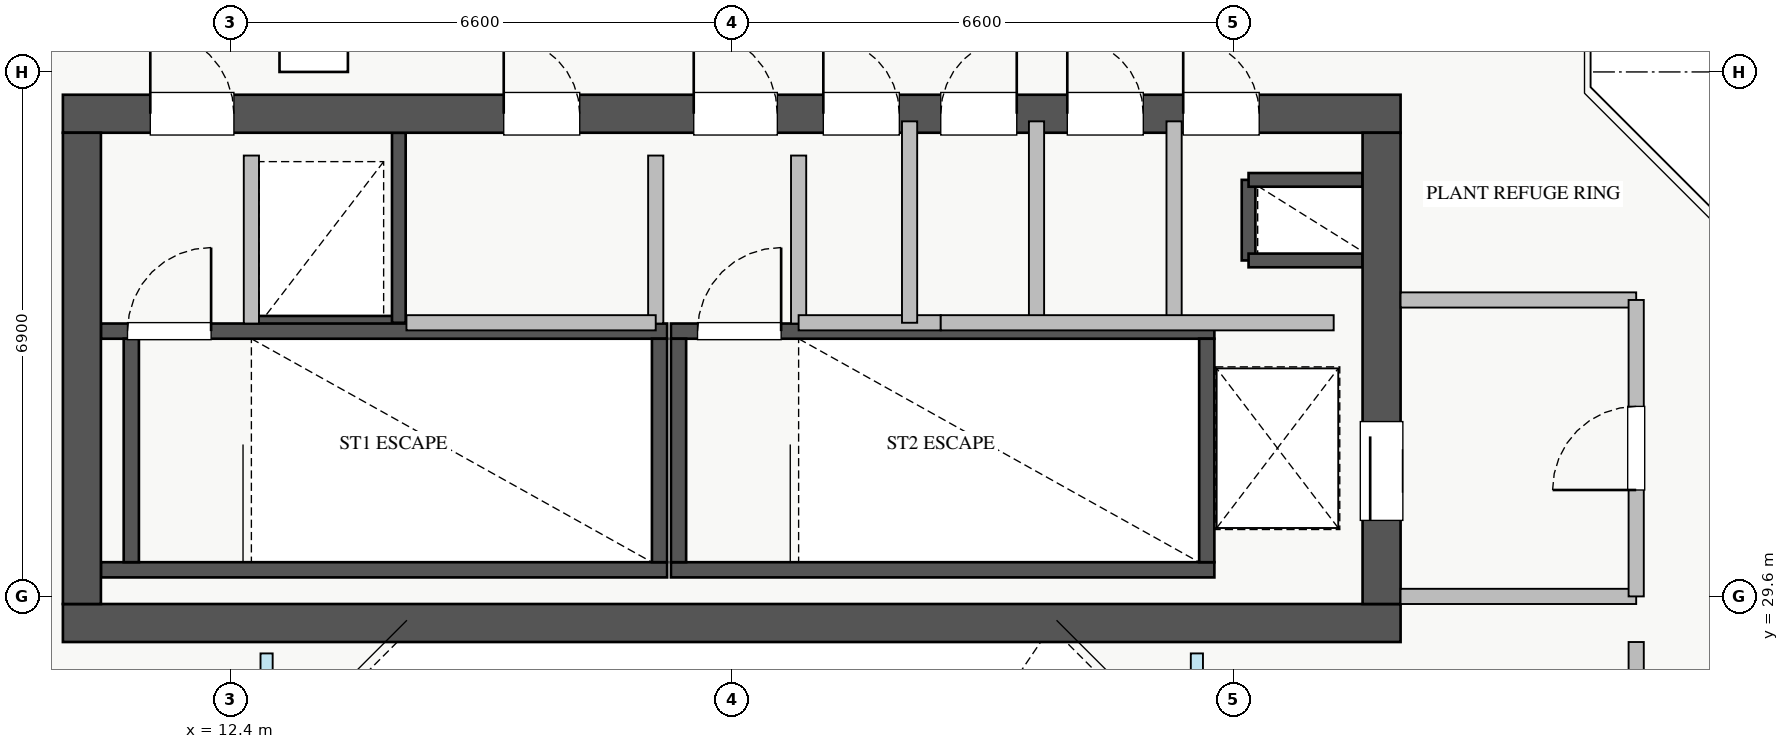
"""IFC4 building model, lengths in metres.
Left out: names, types, materials, properties, quantities, classifications, styles, units other than length and angle.
Written with IfcOpenShell. Run it as: python <this file> out.ifc"""

import sys

from ifc_helpers import new_model, si_unit, direction, frame, frame_2d, origin, origin_2d, place, context, subcontext, project, spatial, rectangle, extrude, source, transform, mapped, element, fill, save


model = new_model("IFC4")
c1 = context("Model", 3, precision=1e-05, world=origin(), true_north=direction((0.0, 1.0)))
c2 = subcontext(c1, "Body", "Model", "MODEL_VIEW")
j1 = project(units=[si_unit("LENGTHUNIT", "METRE"), si_unit("PLANEANGLEUNIT", "RADIAN")], contexts=[c1])
p1 = place(None, origin())
s1 = spatial("IfcSite", under=j1, at=p1, CompositionType="ELEMENT")
p2 = place(p1, origin())
s2 = spatial("IfcBuilding", under=s1, at=p2, CompositionType="ELEMENT")
p3 = place(p2, frame((0.0, 0.0, 263.25)))
s3 = spatial("IfcBuildingStorey", under=s2, at=p3, CompositionType="ELEMENT", Elevation=263.25)
p4 = place(p3, frame((12.68, 33.2, 0.0), z_axis=(0.0, 0.0, 1.0), x_axis=(1.0, 0.0, 0.0)))
e1 = element("IfcWall", 1, at=p4, inside=s3, PredefinedType="SHEAR", context=c2, shape_type="SweptSolid", body=[
    extrude(rectangle(XDim=1.94, YDim=0.18, at=frame_2d((0.97, 0.0))), origin(), (0.0, 0.0, 1.0), 4.25),
])
p5 = place(p3, frame((14.62, 33.2, 0.0), z_axis=(0.0, 0.0, 1.0), x_axis=(0.0, 1.0, 0.0)))
e2 = element("IfcWall", 2, at=p5, inside=s3, PredefinedType="SHEAR", context=c2, shape_type="SweptSolid", body=[
    extrude(rectangle(XDim=2.5, YDim=0.18, at=frame_2d((1.25, 0.0))), origin(), (0.0, 0.0, 1.0), 4.25),
])
p6 = place(p3, frame((25.8, 34.02, 0.0), z_axis=(0.0, 0.0, 1.0), x_axis=(0.0, 1.0, 0.0)))
e3 = element("IfcWall", 3, at=p6, inside=s3, PredefinedType="SHEAR", context=c2, shape_type="SweptSolid", body=[
    extrude(rectangle(XDim=1.06, YDim=0.18, at=frame_2d((0.53, 0.0))), origin(), (0.0, 0.0, 1.0), 4.25),
])
for number, where, z_axis, x_axis in (
    (4, (25.8, 35.08, 0.0), (0.0, 0.0, 1.0), (1.0, 0.0, 0.0)),
    (5, (25.8, 34.02, 0.0), (0.0, 0.0, 1.0), (1.0, 0.0, 0.0)),
):
    element("IfcWall", number, at=place(p3, frame(where, z_axis=z_axis, x_axis=x_axis)), inside=s3, PredefinedType="SHEAR", context=c2, shape_type="SweptSolid", body=[
        extrude(rectangle(XDim=1.5, YDim=0.18, at=frame_2d((0.75, 0.0))), origin(), (0.0, 0.0, 1.0), 4.25),
    ])
p7 = place(p3, frame((10.7, 29.95, 0.0), z_axis=(0.0, 0.0, 1.0), x_axis=(1.0, 0.0, 0.0)))
e6 = element("IfcWall", 6, at=p7, inside=s3, PredefinedType="SHEAR", context=c2, shape_type="SweptSolid", body=[
    extrude(rectangle(XDim=7.45, YDim=0.2, at=frame_2d((3.725, 0.0))), origin(), (0.0, 0.0, 1.0), 4.5),
])
p8 = place(p3, frame((10.7, 33.09, 0.0), z_axis=(0.0, 0.0, 1.0), x_axis=(1.0, 0.0, 0.0)))
e7 = element("IfcWall", 7, at=p8, inside=s3, PredefinedType="SHEAR", context=c2, shape_type="SweptSolid", body=[
    extrude(rectangle(XDim=7.45, YDim=0.2, at=frame_2d((3.725, 0.0))), origin(), (0.0, 0.0, 1.0), 4.5),
])
p9 = place(p8, frame((0.35, 0.0, 0.0)))
e8 = element("IfcOpeningElement", 8, at=p9, cuts=e7, PredefinedType="OPENING", context=c2, shape_type="SweptSolid", body=[
    extrude(rectangle(XDim=1.1, YDim=2.05, at=frame_2d((0.55, 1.025))), frame((0.0, 0.11, 0.0), z_axis=(0.0, -1.0, 0.0), x_axis=(1.0, 0.0, 0.0)), (0.0, 0.0, 1.0), 0.22),
])
for number, where, z_axis, x_axis in (
    (9, (11.1, 30.05, 0.0), (0.0, 0.0, 1.0), (0.0, 1.0, 0.0)),
    (10, (18.05, 30.05, 0.0), (0.0, 0.0, 1.0), (0.0, 1.0, 0.0)),
):
    element("IfcWall", number, at=place(p3, frame(where, z_axis=z_axis, x_axis=x_axis)), inside=s3, PredefinedType="SHEAR", context=c2, shape_type="SweptSolid", body=[
        extrude(rectangle(XDim=2.94, YDim=0.2, at=frame_2d((1.47, 0.0))), origin(), (0.0, 0.0, 1.0), 4.5),
    ])
p10 = place(p3, frame((18.2, 29.95, 0.0), z_axis=(0.0, 0.0, 1.0), x_axis=(1.0, 0.0, 0.0)))
e11 = element("IfcWall", 11, at=p10, inside=s3, PredefinedType="SHEAR", context=c2, shape_type="SweptSolid", body=[
    extrude(rectangle(XDim=7.15, YDim=0.2, at=frame_2d((3.575, 0.0))), origin(), (0.0, 0.0, 1.0), 4.5),
])
p11 = place(p3, frame((18.2, 33.09, 0.0), z_axis=(0.0, 0.0, 1.0), x_axis=(1.0, 0.0, 0.0)))
e12 = element("IfcWall", 12, at=p11, inside=s3, PredefinedType="SHEAR", context=c2, shape_type="SweptSolid", body=[
    extrude(rectangle(XDim=7.15, YDim=0.2, at=frame_2d((3.575, 0.0))), origin(), (0.0, 0.0, 1.0), 4.5),
])
p12 = place(p11, frame((0.35, 0.0, 0.0)))
e13 = element("IfcOpeningElement", 13, at=p12, cuts=e12, PredefinedType="OPENING", context=c2, shape_type="SweptSolid", body=[
    extrude(rectangle(XDim=1.1, YDim=2.05, at=frame_2d((0.55, 1.025))), frame((0.0, 0.11, 0.0), z_axis=(0.0, -1.0, 0.0), x_axis=(1.0, 0.0, 0.0)), (0.0, 0.0, 1.0), 0.22),
])
for number, where, z_axis, x_axis in (
    (14, (18.3, 30.05, 0.0), (0.0, 0.0, 1.0), (0.0, 1.0, 0.0)),
    (15, (25.25, 30.05, 0.0), (0.0, 0.0, 1.0), (0.0, 1.0, 0.0)),
):
    element("IfcWall", number, at=place(p3, frame(where, z_axis=z_axis, x_axis=x_axis)), inside=s3, PredefinedType="SHEAR", context=c2, shape_type="SweptSolid", body=[
        extrude(rectangle(XDim=2.94, YDim=0.2, at=frame_2d((1.47, 0.0))), origin(), (0.0, 0.0, 1.0), 4.5),
    ])
p13 = place(p3, frame((10.2, 29.25, 0.0), z_axis=(0.0, 0.0, 1.0), x_axis=(1.0, 0.0, 0.0)))
e16 = element("IfcWall", 16, at=p13, inside=s3, PredefinedType="SHEAR", context=c2, shape_type="SweptSolid", body=[
    extrude(rectangle(XDim=17.6, YDim=0.5, at=frame_2d((8.8, 0.0))), origin(), (0.0, 0.0, 1.0), 4.5),
])
p14 = place(p3, frame((10.2, 35.95, 0.0), z_axis=(0.0, 0.0, 1.0), x_axis=(1.0, 0.0, 0.0)))
e17 = element("IfcWall", 17, at=p14, inside=s3, PredefinedType="SHEAR", context=c2, shape_type="SweptSolid", body=[
    extrude(rectangle(XDim=17.6, YDim=0.5, at=frame_2d((8.8, 0.0))), origin(), (0.0, 0.0, 1.0), 4.5),
])
p15 = place(p14, frame((1.15, 0.0, 0.0)))
e18 = element("IfcOpeningElement", 18, at=p15, cuts=e17, PredefinedType="OPENING", context=c2, shape_type="SweptSolid", body=[
    extrude(rectangle(XDim=1.1, YDim=2.05, at=frame_2d((0.55, 1.025))), frame((0.0, 0.26, 0.0), z_axis=(0.0, -1.0, 0.0), x_axis=(1.0, 0.0, 0.0)), (0.0, 0.0, 1.0), 0.52),
])
p16 = place(p14, frame((8.3, 0.0, 0.0)))
e19 = element("IfcOpeningElement", 19, at=p16, cuts=e17, PredefinedType="OPENING", context=c2, shape_type="SweptSolid", body=[
    extrude(rectangle(XDim=1.1, YDim=2.05, at=frame_2d((0.55, 1.025))), frame((0.0, 0.26, 0.0), z_axis=(0.0, -1.0, 0.0), x_axis=(1.0, 0.0, 0.0)), (0.0, 0.0, 1.0), 0.52),
])
p17 = place(p14, frame((5.8, 0.0, 0.0)))
e20 = element("IfcOpeningElement", 20, at=p17, cuts=e17, PredefinedType="OPENING", context=c2, shape_type="SweptSolid", body=[
    extrude(rectangle(XDim=1.0, YDim=2.05, at=frame_2d((0.5, 1.025))), frame((0.0, 0.26, 0.0), z_axis=(0.0, -1.0, 0.0), x_axis=(1.0, 0.0, 0.0)), (0.0, 0.0, 1.0), 0.52),
])
p18 = place(p14, frame((14.74, 0.0, 0.0)))
e21 = element("IfcOpeningElement", 21, at=p18, cuts=e17, PredefinedType="OPENING", context=c2, shape_type="SweptSolid", body=[
    extrude(rectangle(XDim=1.0, YDim=2.05, at=frame_2d((0.5, 1.025))), frame((0.0, 0.26, 0.0), z_axis=(0.0, -1.0, 0.0), x_axis=(1.0, 0.0, 0.0)), (0.0, 0.0, 1.0), 0.52),
])
p19 = place(p14, frame((10.005, 0.0, 0.0)))
e22 = element("IfcOpeningElement", 22, at=p19, cuts=e17, PredefinedType="OPENING", context=c2, shape_type="SweptSolid", body=[
    extrude(rectangle(XDim=1.0, YDim=2.05, at=frame_2d((0.5, 1.025))), frame((0.0, 0.26, 0.0), z_axis=(0.0, -1.0, 0.0), x_axis=(1.0, 0.0, 0.0)), (0.0, 0.0, 1.0), 0.52),
])
p20 = place(p14, frame((11.55, 0.0, 0.0)))
e23 = element("IfcOpeningElement", 23, at=p20, cuts=e17, PredefinedType="OPENING", context=c2, shape_type="SweptSolid", body=[
    extrude(rectangle(XDim=1.0, YDim=2.05, at=frame_2d((0.5, 1.025))), frame((0.0, 0.26, 0.0), z_axis=(0.0, -1.0, 0.0), x_axis=(1.0, 0.0, 0.0)), (0.0, 0.0, 1.0), 0.52),
])
p21 = place(p14, frame((13.215, 0.0, 0.0)))
e24 = element("IfcOpeningElement", 24, at=p21, cuts=e17, PredefinedType="OPENING", context=c2, shape_type="SweptSolid", body=[
    extrude(rectangle(XDim=1.0, YDim=2.05, at=frame_2d((0.5, 1.025))), frame((0.0, 0.26, 0.0), z_axis=(0.0, -1.0, 0.0), x_axis=(1.0, 0.0, 0.0)), (0.0, 0.0, 1.0), 0.52),
])
p22 = place(p3, frame((10.45, 29.5, 0.0), z_axis=(0.0, 0.0, 1.0), x_axis=(0.0, 1.0, 0.0)))
e25 = element("IfcWall", 25, at=p22, inside=s3, PredefinedType="SHEAR", context=c2, shape_type="SweptSolid", body=[
    extrude(rectangle(XDim=6.2, YDim=0.5, at=frame_2d((3.1, 0.0))), origin(), (0.0, 0.0, 1.0), 4.5),
])
p23 = place(p3, frame((27.55, 29.5, 0.0), z_axis=(0.0, 0.0, 1.0), x_axis=(0.0, 1.0, 0.0)))
e26 = element("IfcWall", 26, at=p23, inside=s3, PredefinedType="SHEAR", context=c2, shape_type="SweptSolid", body=[
    extrude(rectangle(XDim=6.2, YDim=0.5, at=frame_2d((3.1, 0.0))), origin(), (0.0, 0.0, 1.0), 4.5),
])
p24 = place(p23, frame((1.1, 0.0, 0.0)))
e27 = element("IfcOpeningElement", 27, at=p24, cuts=e26, PredefinedType="OPENING", context=c2, shape_type="SweptSolid", body=[
    extrude(rectangle(XDim=1.3, YDim=2.05, at=frame_2d((0.65, 1.025))), frame((0.0, 0.26, 0.0), z_axis=(0.0, -1.0, 0.0), x_axis=(1.0, 0.0, 0.0)), (0.0, 0.0, 1.0), 0.52),
])
for number, where, z_axis, x_axis in (
    (28, (27.8, 29.6, 0.0), (0.0, 0.0, 1.0), (1.0, 0.0, 0.0)),
    (29, (27.8, 33.5, 0.0), (0.0, 0.0, 1.0), (1.0, 0.0, 0.0)),
):
    element("IfcWall", number, at=place(p3, frame(where, z_axis=z_axis, x_axis=x_axis)), inside=s3, PredefinedType="PARTITIONING", context=c2, shape_type="SweptSolid", body=[
        extrude(rectangle(XDim=3.1, YDim=0.2, at=frame_2d((1.55, 0.0))), origin(), (0.0, 0.0, 1.0), 4.25),
    ])
p25 = place(p3, frame((30.9, 29.6, 0.0), z_axis=(0.0, 0.0, 1.0), x_axis=(0.0, 1.0, 0.0)))
e30 = element("IfcWall", 30, at=p25, inside=s3, PredefinedType="PARTITIONING", context=c2, shape_type="SweptSolid", body=[
    extrude(rectangle(XDim=3.9, YDim=0.2, at=frame_2d((1.95, 0.0))), origin(), (0.0, 0.0, 1.0), 4.045),
])
p26 = place(p25, frame((1.4, 0.0, 0.0)))
e31 = element("IfcOpeningElement", 31, at=p26, cuts=e30, PredefinedType="OPENING", context=c2, shape_type="SweptSolid", body=[
    extrude(rectangle(XDim=1.1, YDim=2.05, at=frame_2d((0.55, 1.025))), frame((0.0, 0.11, 0.0), z_axis=(0.0, -1.0, 0.0), x_axis=(1.0, 0.0, 0.0)), (0.0, 0.0, 1.0), 0.22),
])
for number, where, z_axis, x_axis in (
    (32, (12.68, 33.19, 0.0), (0.0, 0.0, 1.0), (0.0, 1.0, 0.0)),
    (33, (18.0, 33.19, 0.0), (0.0, 0.0, 1.0), (0.0, 1.0, 0.0)),
    (34, (19.88, 33.19, 0.0), (0.0, 0.0, 1.0), (0.0, 1.0, 0.0)),
):
    element("IfcWall", number, at=place(p3, frame(where, z_axis=z_axis, x_axis=x_axis)), inside=s3, PredefinedType="PARTITIONING", context=c2, shape_type="SweptSolid", body=[
        extrude(rectangle(XDim=2.21, YDim=0.2, at=frame_2d((1.105, 0.0))), origin(), (0.0, 0.0, 1.0), 4.25),
    ])
p27 = place(p3, frame((14.72, 33.2, 0.0), z_axis=(0.0, 0.0, 1.0), x_axis=(1.0, 0.0, 0.0)))
e35 = element("IfcWall", 35, at=p27, inside=s3, PredefinedType="PARTITIONING", context=c2, shape_type="SweptSolid", body=[
    extrude(rectangle(XDim=3.28, YDim=0.2, at=frame_2d((1.64, 0.0))), origin(), (0.0, 0.0, 1.0), 4.25),
])
p28 = place(p3, frame((24.82, 33.2, 0.0), z_axis=(0.0, 0.0, 1.0), x_axis=(0.0, 1.0, 0.0)))
e36 = element("IfcWall", 36, at=p28, inside=s3, PredefinedType="PARTITIONING", context=c2, shape_type="SweptSolid", body=[
    extrude(rectangle(XDim=2.65, YDim=0.2, at=frame_2d((1.325, 0.0))), origin(), (0.0, 0.0, 1.0), 4.25),
])
p29 = place(p3, frame((19.88, 33.2, 0.0), z_axis=(0.0, 0.0, 1.0), x_axis=(1.0, 0.0, 0.0)))
e37 = element("IfcWall", 37, at=p29, inside=s3, PredefinedType="PARTITIONING", context=c2, shape_type="SweptSolid", body=[
    extrude(rectangle(XDim=1.87, YDim=0.2, at=frame_2d((0.935, 0.0))), origin(), (0.0, 0.0, 1.0), 4.25),
])
for number, where, z_axis, x_axis in (
    (38, (21.34, 33.2, 0.0), (0.0, 0.0, 1.0), (0.0, 1.0, 0.0)),
    (39, (23.01, 33.2, 0.0), (0.0, 0.0, 1.0), (0.0, 1.0, 0.0)),
):
    element("IfcWall", number, at=place(p3, frame(where, z_axis=z_axis, x_axis=x_axis)), inside=s3, PredefinedType="PARTITIONING", context=c2, shape_type="SweptSolid", body=[
        extrude(rectangle(XDim=2.65, YDim=0.2, at=frame_2d((1.325, 0.0))), origin(), (0.0, 0.0, 1.0), 4.25),
    ])
p30 = place(p3, frame((21.75, 33.2, 0.0), z_axis=(0.0, 0.0, 1.0), x_axis=(1.0, 0.0, 0.0)))
e40 = element("IfcWall", 40, at=p30, inside=s3, PredefinedType="PARTITIONING", context=c2, shape_type="SweptSolid", body=[
    extrude(rectangle(XDim=5.17, YDim=0.2, at=frame_2d((2.585, 0.0))), origin(), (0.0, 0.0, 1.0), 4.25),
])
p31 = place(p3, frame((30.9, 17.0, 0.0), z_axis=(0.0, 0.0, 1.0), x_axis=(0.0, 1.0, 0.0)))
e41 = element("IfcWall", 41, at=p31, inside=s3, PredefinedType="PARTITIONING", context=c2, shape_type="SweptSolid", body=[
    extrude(rectangle(XDim=12.0, YDim=0.2, at=frame_2d((6.0, 0.0))), origin(), (0.0, 0.0, 1.0), 4.045),
])
p32 = place(p31, frame((5.5, 0.0, 0.0)))
e42 = element("IfcOpeningElement", 42, at=p32, cuts=e41, PredefinedType="OPENING", context=c2, shape_type="SweptSolid", body=[
    extrude(rectangle(XDim=1.0, YDim=2.05, at=frame_2d((0.5, 1.025))), frame((0.0, 0.11, 0.0), z_axis=(0.0, -1.0, 0.0), x_axis=(1.0, 0.0, 0.0)), (0.0, 0.0, 1.0), 0.22),
])
p33 = place(p3, frame((0.0, 0.0, -0.22)))
p34 = place(p33, frame((13.5, 36.95, 0.0)))
p35 = place(p34, frame((0.0, 0.0, 0.17)))
e43 = element("IfcDoor", 43, at=p35, inside=s3, OperationType="SINGLE_SWING_LEFT", PredefinedType="TRAPDOOR", context=c2, shape_type="SweptSolid", body=[
    extrude(rectangle(XDim=0.9, YDim=0.9, at=origin_2d()), origin(), (0.0, 0.0, 1.0), 0.05),
])
m1 = source(origin(), c2, "Body", "SweptSolid", [
    extrude(rectangle(XDim=1.3, YDim=2.05, at=frame_2d((0.65, 1.025))), frame((0.0, 0.025, 0.0), z_axis=(0.0, -1.0, 0.0), x_axis=(1.0, 0.0, 0.0)), (0.0, 0.0, 1.0), 0.05),
])
p36 = place(p24, origin())
e44 = element("IfcDoor", 44, at=p36, inside=s3, OperationType="SLIDING_TO_LEFT", PredefinedType="DOOR", context=c2, shape_type="MappedRepresentation", body=[
    mapped(m1, transform((0.0, 0.0, 0.0), x_axis=(1.0, 0.0, 0.0), y_axis=(0.0, 1.0, 0.0), z_axis=(0.0, 0.0, 1.0), scale=1.0)),
])
fill(e27, e44)
m2 = source(origin(), c2, "Body", "SweptSolid", [
    extrude(rectangle(XDim=1.1, YDim=2.05, at=frame_2d((0.55, 1.025))), frame((0.0, 0.025, 0.0), z_axis=(0.0, -1.0, 0.0), x_axis=(1.0, 0.0, 0.0)), (0.0, 0.0, 1.0), 0.05),
])
p37 = place(p15, origin())
e45 = element("IfcDoor", 45, at=p37, inside=s3, OperationType="SINGLE_SWING_LEFT", PredefinedType="DOOR", context=c2, shape_type="MappedRepresentation", body=[
    mapped(m2, transform((0.0, 0.0, 0.0), x_axis=(1.0, 0.0, 0.0), y_axis=(0.0, 1.0, 0.0), z_axis=(0.0, 0.0, 1.0), scale=1.0)),
])
fill(e18, e45)
p38 = place(p9, origin())
e46 = element("IfcDoor", 46, at=p38, inside=s3, OperationType="SINGLE_SWING_RIGHT", PredefinedType="DOOR", context=c2, shape_type="MappedRepresentation", body=[
    mapped(m2, transform((0.0, 0.0, 0.0), x_axis=(1.0, 0.0, 0.0), y_axis=(0.0, 1.0, 0.0), z_axis=(0.0, 0.0, 1.0), scale=1.0)),
])
fill(e8, e46)
p39 = place(p16, origin())
e47 = element("IfcDoor", 47, at=p39, inside=s3, OperationType="SINGLE_SWING_LEFT", PredefinedType="DOOR", context=c2, shape_type="MappedRepresentation", body=[
    mapped(m2, transform((0.0, 0.0, 0.0), x_axis=(1.0, 0.0, 0.0), y_axis=(0.0, 1.0, 0.0), z_axis=(0.0, 0.0, 1.0), scale=1.0)),
])
fill(e19, e47)
p40 = place(p12, origin())
e48 = element("IfcDoor", 48, at=p40, inside=s3, OperationType="SINGLE_SWING_RIGHT", PredefinedType="DOOR", context=c2, shape_type="MappedRepresentation", body=[
    mapped(m2, transform((0.0, 0.0, 0.0), x_axis=(1.0, 0.0, 0.0), y_axis=(0.0, 1.0, 0.0), z_axis=(0.0, 0.0, 1.0), scale=1.0)),
])
fill(e13, e48)
m3 = source(origin(), c2, "Body", "SweptSolid", [
    extrude(rectangle(XDim=1.0, YDim=2.05, at=frame_2d((0.5, 1.025))), frame((0.0, 0.025, 0.0), z_axis=(0.0, -1.0, 0.0), x_axis=(1.0, 0.0, 0.0)), (0.0, 0.0, 1.0), 0.05),
])
p41 = place(p17, origin())
e49 = element("IfcDoor", 49, at=p41, inside=s3, OperationType="SINGLE_SWING_LEFT", PredefinedType="DOOR", context=c2, shape_type="MappedRepresentation", body=[
    mapped(m3, transform((0.0, 0.0, 0.0), x_axis=(1.0, 0.0, 0.0), y_axis=(0.0, 1.0, 0.0), z_axis=(0.0, 0.0, 1.0), scale=1.0)),
])
fill(e20, e49)
p42 = place(p18, origin())
e50 = element("IfcDoor", 50, at=p42, inside=s3, OperationType="SINGLE_SWING_LEFT", PredefinedType="DOOR", context=c2, shape_type="MappedRepresentation", body=[
    mapped(m3, transform((0.0, 0.0, 0.0), x_axis=(1.0, 0.0, 0.0), y_axis=(0.0, 1.0, 0.0), z_axis=(0.0, 0.0, 1.0), scale=1.0)),
])
fill(e21, e50)
p43 = place(p19, origin())
e51 = element("IfcDoor", 51, at=p43, inside=s3, OperationType="SINGLE_SWING_LEFT", PredefinedType="DOOR", context=c2, shape_type="MappedRepresentation", body=[
    mapped(m3, transform((0.0, 0.0, 0.0), x_axis=(1.0, 0.0, 0.0), y_axis=(0.0, 1.0, 0.0), z_axis=(0.0, 0.0, 1.0), scale=1.0)),
])
fill(e22, e51)
p44 = place(p20, origin())
e52 = element("IfcDoor", 52, at=p44, inside=s3, OperationType="SINGLE_SWING_RIGHT", PredefinedType="DOOR", context=c2, shape_type="MappedRepresentation", body=[
    mapped(m3, transform((0.0, 0.0, 0.0), x_axis=(1.0, 0.0, 0.0), y_axis=(0.0, 1.0, 0.0), z_axis=(0.0, 0.0, 1.0), scale=1.0)),
])
fill(e23, e52)
p45 = place(p21, origin())
e53 = element("IfcDoor", 53, at=p45, inside=s3, OperationType="SINGLE_SWING_LEFT", PredefinedType="DOOR", context=c2, shape_type="MappedRepresentation", body=[
    mapped(m3, transform((0.0, 0.0, 0.0), x_axis=(1.0, 0.0, 0.0), y_axis=(0.0, 1.0, 0.0), z_axis=(0.0, 0.0, 1.0), scale=1.0)),
])
fill(e24, e53)
p46 = place(p26, origin())
e54 = element("IfcDoor", 54, at=p46, inside=s3, OperationType="SINGLE_SWING_LEFT", PredefinedType="DOOR", context=c2, shape_type="MappedRepresentation", body=[
    mapped(m2, transform((0.0, 0.0, 0.0), x_axis=(1.0, 0.0, 0.0), y_axis=(0.0, 1.0, 0.0), z_axis=(0.0, 0.0, 1.0), scale=1.0)),
])
fill(e31, e54)
save(model, sys.argv[1])
